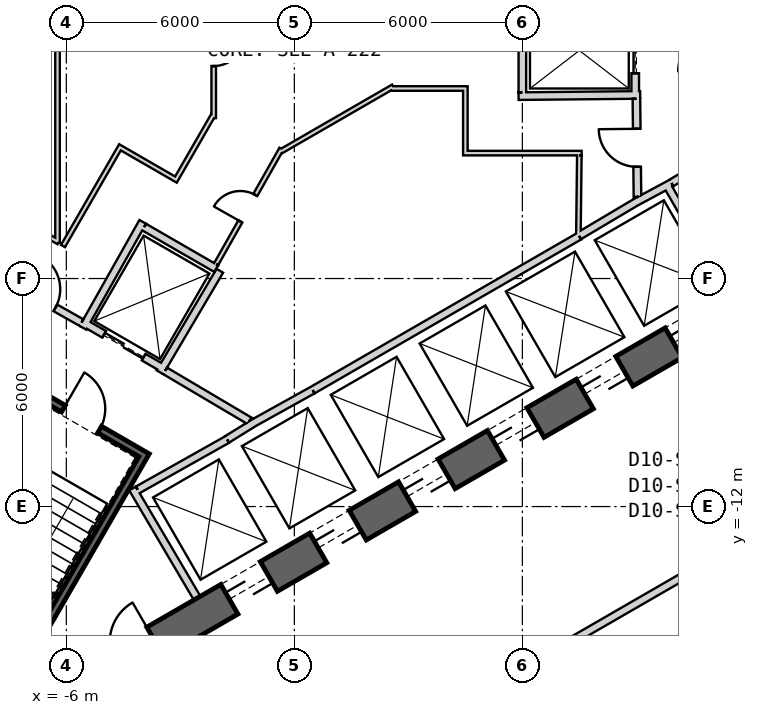
"""IFC4 building model, lengths in metres.
Left out: names, types, materials, properties, quantities, classifications, styles, units other than length and angle.
Written with IfcOpenShell. Run it as: python <this file> out.ifc"""

import sys

from ifc_helpers import new_model, si_unit, direction, frame, frame_2d, origin, place, context, subcontext, project, spatial, rectangle, extrude, element, fill, save


model = new_model("IFC4")
c1 = context("Model", 3, precision=1e-05, world=origin(), true_north=direction((0.0, 1.0)))
c2 = subcontext(c1, "Body", "Model", "MODEL_VIEW")
j1 = project(units=[si_unit("LENGTHUNIT", "METRE"), si_unit("PLANEANGLEUNIT", "RADIAN")], contexts=[c1])
p1 = place(None, origin())
s1 = spatial("IfcSite", under=j1, at=p1, CompositionType="ELEMENT")
p2 = place(p1, origin())
s2 = spatial("IfcBuilding", under=s1, at=p2, CompositionType="ELEMENT")
p3 = place(p2, frame((0.0, 0.0, 181.2)))
s3 = spatial("IfcBuildingStorey", under=s2, at=p3, CompositionType="ELEMENT", Elevation=181.2)
p4 = place(p3, frame((-7.825, -17.97, 0.0), z_axis=(0.0, 0.0, 1.0), x_axis=(0.866028369851, 0.499994862586, 0.0)))
e1 = element("IfcWall", 1, at=p4, inside=s3, PredefinedType="SHEAR", context=c2, shape_type="SweptSolid", body=[
    extrude(rectangle(XDim=31.523, YDim=0.9, at=frame_2d((15.762, 0.0))), origin(), (0.0, 0.0, 1.0), 4.0),
])
p5 = place(p4, frame((7.062, 0.0, 0.0)))
e2 = element("IfcOpeningElement", 2, at=p5, cuts=e1, PredefinedType="OPENING", context=c2, shape_type="SweptSolid", body=[
    extrude(rectangle(XDim=1.2, YDim=2.4, at=frame_2d((0.6, 1.2))), frame((0.0, 0.46, 0.0), z_axis=(0.0, -1.0, 0.0), x_axis=(1.0, 0.0, 0.0)), (0.0, 0.0, 1.0), 0.92),
])
p6 = place(p4, frame((9.762, 0.0, 0.0)))
e3 = element("IfcOpeningElement", 3, at=p6, cuts=e1, PredefinedType="OPENING", context=c2, shape_type="SweptSolid", body=[
    extrude(rectangle(XDim=1.2, YDim=2.4, at=frame_2d((0.6, 1.2))), frame((0.0, 0.46, 0.0), z_axis=(0.0, -1.0, 0.0), x_axis=(1.0, 0.0, 0.0)), (0.0, 0.0, 1.0), 0.92),
])
p7 = place(p4, frame((12.462, 0.0, 0.0)))
e4 = element("IfcOpeningElement", 4, at=p7, cuts=e1, PredefinedType="OPENING", context=c2, shape_type="SweptSolid", body=[
    extrude(rectangle(XDim=1.2, YDim=2.4, at=frame_2d((0.6, 1.2))), frame((0.0, 0.46, 0.0), z_axis=(0.0, -1.0, 0.0), x_axis=(1.0, 0.0, 0.0)), (0.0, 0.0, 1.0), 0.92),
])
p8 = place(p4, frame((15.162, 0.0, 0.0)))
e5 = element("IfcOpeningElement", 5, at=p8, cuts=e1, PredefinedType="OPENING", context=c2, shape_type="SweptSolid", body=[
    extrude(rectangle(XDim=1.2, YDim=2.4, at=frame_2d((0.6, 1.2))), frame((0.0, 0.46, 0.0), z_axis=(0.0, -1.0, 0.0), x_axis=(1.0, 0.0, 0.0)), (0.0, 0.0, 1.0), 0.92),
])
p9 = place(p4, frame((17.862, 0.0, 0.0)))
e6 = element("IfcOpeningElement", 6, at=p9, cuts=e1, PredefinedType="OPENING", context=c2, shape_type="SweptSolid", body=[
    extrude(rectangle(XDim=1.2, YDim=2.4, at=frame_2d((0.6, 1.2))), frame((0.0, 0.46, 0.0), z_axis=(0.0, -1.0, 0.0), x_axis=(1.0, 0.0, 0.0)), (0.0, 0.0, 1.0), 0.92),
])
p10 = place(p4, frame((20.562, 0.0, 0.0)))
e7 = element("IfcOpeningElement", 7, at=p10, cuts=e1, PredefinedType="OPENING", context=c2, shape_type="SweptSolid", body=[
    extrude(rectangle(XDim=1.2, YDim=2.4, at=frame_2d((0.6, 1.2))), frame((0.0, 0.46, 0.0), z_axis=(0.0, -1.0, 0.0), x_axis=(1.0, 0.0, 0.0)), (0.0, 0.0, 1.0), 0.92),
])
p11 = place(p4, frame((26.712, 0.0, 0.0)))
e8 = element("IfcOpeningElement", 8, at=p11, cuts=e1, PredefinedType="OPENING", context=c2, shape_type="SweptSolid", body=[
    extrude(rectangle(XDim=1.2, YDim=2.4, at=frame_2d((0.6, 1.2))), frame((0.0, 0.46, 0.0), z_axis=(0.0, -1.0, 0.0), x_axis=(1.0, 0.0, 0.0)), (0.0, 0.0, 1.0), 0.92),
])
p12 = place(p4, frame((3.612, 0.0, 0.0)))
e9 = element("IfcOpeningElement", 9, at=p12, cuts=e1, PredefinedType="OPENING", context=c2, shape_type="SweptSolid", body=[
    extrude(rectangle(XDim=1.2, YDim=2.4, at=frame_2d((0.6, 1.2))), frame((0.0, 0.46, 0.0), z_axis=(0.0, -1.0, 0.0), x_axis=(1.0, 0.0, 0.0)), (0.0, 0.0, 1.0), 0.92),
])
p13 = place(p3, frame((0.483, -8.936, 0.0), z_axis=(0.0, 0.0, 1.0), x_axis=(0.866030989016, 0.499990325971, 0.0)))
e10 = element("IfcWall", 10, at=p13, inside=s3, PredefinedType="PLUMBINGWALL", context=c2, shape_type="SweptSolid", body=[
    extrude(rectangle(XDim=8.1, YDim=0.2, at=frame_2d((4.05, 0.0))), origin(), (0.0, 0.0, 1.0), 3.7),
])
p14 = place(p3, frame((9.795, -3.525, 0.0), z_axis=(0.0, 0.0, 1.0), x_axis=(0.499984717929, -0.866034226713, 0.0)))
e11 = element("IfcWall", 11, at=p14, inside=s3, PredefinedType="PLUMBINGWALL", context=c2, shape_type="SweptSolid", body=[
    extrude(rectangle(XDim=3.25, YDim=0.2, at=frame_2d((1.625, 0.0))), origin(), (0.0, 0.0, 1.0), 3.7),
])
p15 = place(p3, frame((8.974, -3.999, 0.0), z_axis=(0.0, 0.0, 1.0), x_axis=(0.880907015104, 0.473289373154, 0.0)))
e12 = element("IfcWall", 12, at=p15, inside=s3, PredefinedType="PLUMBINGWALL", context=c2, shape_type="SweptSolid", body=[
    extrude(rectangle(XDim=1.078, YDim=0.2, at=frame_2d((0.539, 0.0))), origin(), (0.0, 0.0, 1.0), 3.7),
])
p16 = place(p3, frame((7.493, -4.878, 0.0), z_axis=(0.0, 0.0, 1.0), x_axis=(0.859981807212, 0.510324691999, 0.0)))
e13 = element("IfcWall", 13, at=p16, inside=s3, PredefinedType="PLUMBINGWALL", context=c2, shape_type="SweptSolid", body=[
    extrude(rectangle(XDim=1.845, YDim=0.2, at=frame_2d((0.922, 0.0))), origin(), (0.0, 0.0, 1.0), 3.7),
])
p17 = place(p3, frame((-2.558, -14.409, 0.0), z_axis=(0.0, 0.0, 1.0), x_axis=(-0.507997497166, 0.861358544901, 0.0)))
e14 = element("IfcWall", 14, at=p17, inside=s3, PredefinedType="PLUMBINGWALL", context=c2, shape_type="SweptSolid", body=[
    extrude(rectangle(XDim=3.35, YDim=0.2, at=frame_2d((1.675, 0.0))), origin(), (0.0, 0.0, 1.0), 3.7),
])
p18 = place(p3, frame((-1.769, -10.237, 0.0), z_axis=(0.0, 0.0, 1.0), x_axis=(-0.871534483978, -0.490334215854, 0.0)))
e15 = element("IfcWall", 15, at=p18, inside=s3, PredefinedType="PLUMBINGWALL", context=c2, shape_type="SweptSolid", body=[
    extrude(rectangle(XDim=2.7, YDim=0.2, at=frame_2d((1.35, 0.0))), origin(), (0.0, 0.0, 1.0), 3.7),
])
p19 = place(p3, frame((-1.024, -9.771, 0.0), z_axis=(0.0, 0.0, 1.0), x_axis=(-0.850348075135, -0.526220629693, 0.0)))
e16 = element("IfcWall", 16, at=p19, inside=s3, PredefinedType="PLUMBINGWALL", context=c2, shape_type="SweptSolid", body=[
    extrude(rectangle(XDim=0.878, YDim=0.2, at=frame_2d((0.439, 0.0))), origin(), (0.0, 0.0, 1.0), 3.7),
])
p20 = place(p3, frame((-1.13, -9.831, 0.0), z_axis=(0.0, 0.0, 1.0), x_axis=(0.874269620932, 0.485440655401, 0.0)))
e17 = element("IfcWall", 17, at=p20, inside=s3, PredefinedType="PLUMBINGWALL", context=c2, shape_type="SweptSolid", body=[
    extrude(rectangle(XDim=1.845, YDim=0.2, at=frame_2d((0.922, 0.0))), origin(), (0.0, 0.0, 1.0), 3.7),
])
p21 = place(p3, frame((8.97, 1.2, 0.0), z_axis=(0.0, 0.0, 1.0), x_axis=(0.0, -1.0, 0.0)))
e18 = element("IfcWall", 18, at=p21, inside=s3, PredefinedType="PLUMBINGWALL", context=c2, shape_type="SweptSolid", body=[
    extrude(rectangle(XDim=2.4, YDim=0.2, at=frame_2d((1.2, 0.0))), origin(), (0.0, 0.0, 1.0), 3.7),
])
p22 = place(p21, frame((0.6, 0.0, 0.0)))
e19 = element("IfcOpeningElement", 19, at=p22, cuts=e18, PredefinedType="OPENING", context=c2, shape_type="SweptSolid", body=[
    extrude(rectangle(XDim=1.2, YDim=2.4, at=frame_2d((0.6, 1.2))), frame((0.0, 0.11, 0.0), z_axis=(0.0, -1.0, 0.0), x_axis=(1.0, 0.0, 0.0)), (0.0, 0.0, 1.0), 0.22),
])
p23 = place(p3, frame((5.9, -1.201, 0.0), z_axis=(0.0, 0.0, 1.0), x_axis=(0.999950064753, 0.009993397809, 0.0)))
e20 = element("IfcWall", 20, at=p23, inside=s3, PredefinedType="PLUMBINGWALL", context=c2, shape_type="SweptSolid", body=[
    extrude(rectangle(XDim=3.2, YDim=0.2, at=frame_2d((1.6, 0.0))), origin(), (0.0, 0.0, 1.0), 3.7),
])
p24 = place(p3, frame((6.0, -1.1, 0.0), z_axis=(0.0, 0.0, 1.0), x_axis=(0.0, 1.0, 0.0)))
e21 = element("IfcWall", 21, at=p24, inside=s3, PredefinedType="PLUMBINGWALL", context=c2, shape_type="SweptSolid", body=[
    extrude(rectangle(XDim=2.205, YDim=0.2, at=frame_2d((1.102, 0.0))), origin(), (0.0, 0.0, 1.0), 3.7),
])
p25 = place(p3, frame((-3.905, -10.563, -0.3), z_axis=(0.0, 0.0, 1.0), x_axis=(-0.500012932018, -0.866017937352, 0.0)))
e22 = element("IfcWall", 22, at=p25, inside=s3, PredefinedType="SHEAR", context=c2, shape_type="SweptSolid", body=[
    extrude(rectangle(XDim=8.1, YDim=0.2, at=frame_2d((4.05, 0.0))), origin(), (0.0, 0.0, 1.0), 4.0),
])
p26 = place(p3, frame((-4.041, -10.599, -0.3), z_axis=(0.0, 0.0, 1.0), x_axis=(-0.866047807691, 0.499961193289, 0.0)))
e23 = element("IfcWall", 23, at=p26, inside=s3, PredefinedType="SHEAR", context=c2, shape_type="SweptSolid", body=[
    extrude(rectangle(XDim=3.6, YDim=0.2, at=frame_2d((1.8, 0.0))), origin(), (0.0, 0.0, 1.0), 4.0),
])
p27 = place(p26, frame((1.25, 0.0, 0.3)))
e24 = element("IfcOpeningElement", 24, at=p27, cuts=e23, PredefinedType="OPENING", context=c2, shape_type="SweptSolid", body=[
    extrude(rectangle(XDim=1.1, YDim=2.1, at=frame_2d((0.55, 1.05))), frame((0.0, 0.11, 0.0), z_axis=(0.0, -1.0, 0.0), x_axis=(1.0, 0.0, 0.0)), (0.0, 0.0, 1.0), 0.22),
])
p28 = place(p3, frame((-3.446, -8.368, 0.0), z_axis=(0.0, 0.0, 1.0), x_axis=(-0.866024647952, 0.500001309137, 0.0)))
e25 = element("IfcWall", 25, at=p28, inside=s3, PredefinedType="PLUMBINGWALL", context=c2, shape_type="SweptSolid", body=[
    extrude(rectangle(XDim=2.4, YDim=0.2, at=frame_2d((1.2, 0.0))), origin(), (0.0, 0.0, 1.0), 3.7),
])
p29 = place(p28, frame((0.6, 0.0, 0.0)))
e26 = element("IfcOpeningElement", 26, at=p29, cuts=e25, PredefinedType="OPENING", context=c2, shape_type="SweptSolid", body=[
    extrude(rectangle(XDim=1.2, YDim=2.4, at=frame_2d((0.6, 1.2))), frame((0.0, 0.11, 0.0), z_axis=(0.0, -1.0, 0.0), x_axis=(1.0, 0.0, 0.0)), (0.0, 0.0, 1.0), 0.22),
])
p30 = place(p3, frame((-1.961, -5.796, 0.0), z_axis=(0.0, 0.0, 1.0), x_axis=(-0.508647062354, -0.860975125052, 0.0)))
e27 = element("IfcWall", 27, at=p30, inside=s3, PredefinedType="PLUMBINGWALL", context=c2, shape_type="SweptSolid", body=[
    extrude(rectangle(XDim=3.1, YDim=0.2, at=frame_2d((1.55, 0.0))), origin(), (0.0, 0.0, 1.0), 3.7),
])
p31 = place(p3, frame((-3.99, -4.509, 0.0), z_axis=(0.0, 0.0, 1.0), x_axis=(-0.491358283181, -0.870957540612, 0.0)))
e28 = element("IfcWall", 28, at=p31, inside=s3, PredefinedType="PLUMBINGWALL", context=c2, shape_type="SweptSolid", body=[
    extrude(rectangle(XDim=3.2, YDim=0.2, at=frame_2d((1.6, 0.0))), origin(), (0.0, 0.0, 1.0), 3.7),
])
p32 = place(p3, frame((-3.953, -4.646, 0.0), z_axis=(0.0, 0.0, 1.0), x_axis=(0.866038900241, -0.499976622722, 0.0)))
e29 = element("IfcWall", 29, at=p32, inside=s3, PredefinedType="PLUMBINGWALL", context=c2, shape_type="SweptSolid", body=[
    extrude(rectangle(XDim=2.189, YDim=0.2, at=frame_2d((1.095, 0.0))), origin(), (0.0, 0.0, 1.0), 3.7),
])
p33 = place(p3, frame((12.245, -2.109, 0.0), z_axis=(0.0, 0.0, 1.0), x_axis=(-0.860414880418, -0.509594185166, 0.0)))
e30 = element("IfcWall", 30, at=p33, inside=s3, PredefinedType="PARTITIONING", context=c2, shape_type="SweptSolid", body=[
    extrude(rectangle(XDim=2.7, YDim=0.2, at=frame_2d((1.35, 0.0))), origin(), (0.0, 0.0, 1.0), 3.7),
])
p34 = place(p3, frame((9.029, -3.851, 0.0), z_axis=(0.0, 0.0, 1.0), x_axis=(-0.010783593937, 0.99994185536, 0.0)))
e31 = element("IfcWall", 31, at=p34, inside=s3, PredefinedType="PARTITIONING", context=c2, shape_type="SweptSolid", body=[
    extrude(rectangle(XDim=2.581, YDim=0.2, at=frame_2d((1.291, 0.0))), origin(), (0.0, 0.0, 1.0), 3.7),
])
p35 = place(p34, frame((0.791, 0.0, 0.0)))
e32 = element("IfcOpeningElement", 32, at=p35, cuts=e31, PredefinedType="OPENING", context=c2, shape_type="SweptSolid", body=[
    extrude(rectangle(XDim=1.0, YDim=2.1, at=frame_2d((0.5, 1.05))), frame((0.0, 0.11, 0.0), z_axis=(0.0, -1.0, 0.0), x_axis=(1.0, 0.0, 0.0)), (0.0, 0.0, 1.0), 0.22),
])
p36 = place(p3, frame((-3.401, -8.43, 0.0), z_axis=(0.0, 0.0, 1.0), x_axis=(0.860615607571, -0.509255118781, 0.0)))
e33 = element("IfcWall", 33, at=p36, inside=s3, PredefinedType="PARTITIONING", context=c2, shape_type="SweptSolid", body=[
    extrude(rectangle(XDim=2.581, YDim=0.2, at=frame_2d((1.29, 0.0))), origin(), (0.0, 0.0, 1.0), 3.7),
])
p37 = place(p3, frame((-7.849, -5.894, 0.0), z_axis=(0.0, 0.0, 1.0), x_axis=(0.871363259478, -0.490638431059, 0.0)))
e34 = element("IfcWall", 34, at=p37, inside=s3, PredefinedType="PARTITIONING", context=c2, shape_type="SweptSolid", body=[
    extrude(rectangle(XDim=2.581, YDim=0.2, at=frame_2d((1.291, 0.0))), origin(), (0.0, 0.0, 1.0), 3.7),
])
p38 = place(p37, frame((0.791, 0.0, 0.0)))
e35 = element("IfcOpeningElement", 35, at=p38, cuts=e34, PredefinedType="OPENING", context=c2, shape_type="SweptSolid", body=[
    extrude(rectangle(XDim=1.0, YDim=2.1, at=frame_2d((0.5, 1.05))), frame((0.0, 0.11, 0.0), z_axis=(0.0, -1.0, 0.0), x_axis=(1.0, 0.0, 0.0)), (0.0, 0.0, 1.0), 0.22),
])
p39 = place(p3, frame((-0.34, -2.586, 0.0), z_axis=(0.0, 0.0, 1.0), x_axis=(-0.492647196214, -0.870229130782, 0.0)))
e36 = element("IfcWall", 36, at=p39, inside=s3, PredefinedType="PARTITIONING", context=c2, shape_type="SweptSolid", body=[
    extrude(rectangle(XDim=3.49, YDim=0.12, at=frame_2d((1.745, 0.0))), origin(), (0.0, 0.0, 1.0), 3.7),
])
p40 = place(p39, frame((1.396, 0.0, 0.0)))
e37 = element("IfcOpeningElement", 37, at=p40, cuts=e36, PredefinedType="OPENING", context=c2, shape_type="SweptSolid", body=[
    extrude(rectangle(XDim=0.8, YDim=2.1, at=frame_2d((0.4, 1.05))), frame((0.0, 0.07, 0.0), z_axis=(0.0, -1.0, 0.0), x_axis=(1.0, 0.0, 0.0)), (0.0, 0.0, 1.0), 0.14),
])
p41 = place(p3, frame((2.602, -0.948, 0.0), z_axis=(0.0, 0.0, 1.0), x_axis=(-0.866025804792, -0.499999305434, 0.0)))
e38 = element("IfcWall", 38, at=p41, inside=s3, PredefinedType="PARTITIONING", context=c2, shape_type="SweptSolid", body=[
    extrude(rectangle(XDim=3.435, YDim=0.12, at=frame_2d((1.718, 0.0))), origin(), (0.0, 0.0, 1.0), 3.7),
])
p42 = place(p3, frame((4.56, -1.0, 0.0), z_axis=(0.0, 0.0, 1.0), x_axis=(-1.0, 0.0, 0.0)))
e39 = element("IfcWall", 39, at=p42, inside=s3, PredefinedType="PARTITIONING", context=c2, shape_type="SweptSolid", body=[
    extrude(rectangle(XDim=2.03, YDim=0.12, at=frame_2d((1.015, 0.0))), origin(), (0.0, 0.0, 1.0), 3.7),
])
p43 = place(p3, frame((4.5, -2.76, 0.0), z_axis=(0.0, 0.0, 1.0), x_axis=(0.0, 1.0, 0.0)))
e40 = element("IfcWall", 40, at=p43, inside=s3, PredefinedType="PARTITIONING", context=c2, shape_type="SweptSolid", body=[
    extrude(rectangle(XDim=1.7, YDim=0.12, at=frame_2d((0.85, 0.0))), origin(), (0.0, 0.0, 1.0), 3.7),
])
p44 = place(p3, frame((7.56, -2.7, 0.0), z_axis=(0.0, 0.0, 1.0), x_axis=(-1.0, 0.0, 0.0)))
e41 = element("IfcWall", 41, at=p44, inside=s3, PredefinedType="PARTITIONING", context=c2, shape_type="SweptSolid", body=[
    extrude(rectangle(XDim=3.0, YDim=0.12, at=frame_2d((1.5, 0.0))), origin(), (0.0, 0.0, 1.0), 3.7),
])
p45 = place(p3, frame((7.475, -4.865, 0.0), z_axis=(0.0, 0.0, 1.0), x_axis=(0.011716133148, 0.999931363757, 0.0)))
e42 = element("IfcWall", 42, at=p45, inside=s3, PredefinedType="PARTITIONING", context=c2, shape_type="SweptSolid", body=[
    extrude(rectangle(XDim=2.105, YDim=0.12, at=frame_2d((1.052, 0.0))), origin(), (0.0, 0.0, 1.0), 3.7),
])
p46 = place(p3, frame((-6.231, 5.062, 0.0), z_axis=(0.0, 0.0, 1.0), x_axis=(0.0, -1.0, 0.0)))
e43 = element("IfcWall", 43, at=p46, inside=s3, PredefinedType="PARTITIONING", context=c2, shape_type="SweptSolid", body=[
    extrude(rectangle(XDim=10.125, YDim=0.12, at=frame_2d((5.062, 0.0))), origin(), (0.0, 0.0, 1.0), 3.7),
])
p47 = place(p3, frame((-7.95, -4.041, 0.0), z_axis=(0.0, 0.0, 1.0), x_axis=(0.867071050325, -0.498184497639, 0.0)))
e44 = element("IfcWall", 44, at=p47, inside=s3, PredefinedType="PARTITIONING", context=c2, shape_type="SweptSolid", body=[
    extrude(rectangle(XDim=2.017, YDim=0.12, at=frame_2d((1.008, 0.0))), origin(), (0.0, 0.0, 1.0), 3.7),
])
p48 = place(p47, frame((0.608, 0.0, 0.0)))
e45 = element("IfcOpeningElement", 45, at=p48, cuts=e44, PredefinedType="OPENING", context=c2, shape_type="SweptSolid", body=[
    extrude(rectangle(XDim=0.8, YDim=2.1, at=frame_2d((0.4, 1.05))), frame((0.0, 0.07, 0.0), z_axis=(0.0, -1.0, 0.0), x_axis=(1.0, 0.0, 0.0)), (0.0, 0.0, 1.0), 0.14),
])
p49 = place(p3, frame((-2.122, -1.779, 0.0), z_axis=(0.0, 0.0, 1.0), x_axis=(0.0, 1.0, 0.0)))
e46 = element("IfcWall", 46, at=p49, inside=s3, PredefinedType="PARTITIONING", context=c2, shape_type="SweptSolid", body=[
    extrude(rectangle(XDim=3.435, YDim=0.12, at=frame_2d((1.718, 0.0))), origin(), (0.0, 0.0, 1.0), 3.7),
])
p50 = place(p49, frame((1.37, 0.0, 0.0)))
e47 = element("IfcOpeningElement", 47, at=p50, cuts=e46, PredefinedType="OPENING", context=c2, shape_type="SweptSolid", body=[
    extrude(rectangle(XDim=0.8, YDim=2.1, at=frame_2d((0.4, 1.05))), frame((0.0, 0.07, 0.0), z_axis=(0.0, -1.0, 0.0), x_axis=(1.0, 0.0, 0.0)), (0.0, 0.0, 1.0), 0.14),
])
p51 = place(p3, frame((-3.146, -3.449, 0.0), z_axis=(0.0, 0.0, 1.0), x_axis=(0.500007041985, 0.866021338054, 0.0)))
e48 = element("IfcWall", 48, at=p51, inside=s3, PredefinedType="PARTITIONING", context=c2, shape_type="SweptSolid", body=[
    extrude(rectangle(XDim=2.03, YDim=0.12, at=frame_2d((1.015, 0.0))), origin(), (0.0, 0.0, 1.0), 3.7),
])
p52 = place(p3, frame((-4.64, -2.517, 0.0), z_axis=(0.0, 0.0, 1.0), x_axis=(0.865989465428, -0.500062241894, 0.0)))
e49 = element("IfcWall", 49, at=p52, inside=s3, PredefinedType="PARTITIONING", context=c2, shape_type="SweptSolid", body=[
    extrude(rectangle(XDim=1.7, YDim=0.12, at=frame_2d((0.85, 0.0))), origin(), (0.0, 0.0, 1.0), 3.7),
])
p53 = place(p3, frame((-6.088, -5.145, 0.0), z_axis=(0.0, 0.0, 1.0), x_axis=(0.500050696077, 0.865996132412, 0.0)))
e50 = element("IfcWall", 50, at=p53, inside=s3, PredefinedType="PARTITIONING", context=c2, shape_type="SweptSolid", body=[
    extrude(rectangle(XDim=2.94, YDim=0.12, at=frame_2d((1.47, 0.0))), origin(), (0.0, 0.0, 1.0), 3.7),
])
p54 = place(p3, frame((-0.223, -19.874, 0.0), z_axis=(0.0, 0.0, 1.0), x_axis=(0.866025366729, 0.500000064182, 0.0)))
e51 = element("IfcWall", 51, at=p54, inside=s3, PredefinedType="PARTITIONING", context=c2, shape_type="SweptSolid", body=[
    extrude(rectangle(XDim=12.18, YDim=0.2, at=frame_2d((6.09, 0.0))), origin(), (0.0, 0.0, 1.0), 2.98),
])
p55 = place(p35, origin())
e52 = element("IfcDoor", 52, at=p55, inside=s3, OperationType="SINGLE_SWING_RIGHT", PredefinedType="USERDEFINED", context=c2, shape_type="SweptSolid", body=[
    extrude(rectangle(XDim=1.0, YDim=2.1, at=frame_2d((0.5, 1.05))), frame((0.0, 0.025, 0.0), z_axis=(0.0, -1.0, 0.0), x_axis=(1.0, 0.0, 0.0)), (0.0, 0.0, 1.0), 0.05),
])
fill(e32, e52)
p56 = place(p22, origin())
e53 = element("IfcDoor", 53, at=p56, inside=s3, OperationType="SLIDING_TO_LEFT", PredefinedType="USERDEFINED", context=c2, shape_type="SweptSolid", body=[
    extrude(rectangle(XDim=1.2, YDim=2.4, at=frame_2d((0.6, 1.2))), frame((0.0, 0.025, 0.0), z_axis=(0.0, -1.0, 0.0), x_axis=(1.0, 0.0, 0.0)), (0.0, 0.0, 1.0), 0.05),
])
fill(e19, e53)
p57 = place(p27, origin())
e54 = element("IfcDoor", 54, at=p57, inside=s3, OperationType="SINGLE_SWING_LEFT", PredefinedType="USERDEFINED", context=c2, shape_type="SweptSolid", body=[
    extrude(rectangle(XDim=1.1, YDim=2.1, at=frame_2d((0.55, 1.05))), frame((0.0, 0.025, 0.0), z_axis=(0.0, -1.0, 0.0), x_axis=(1.0, 0.0, 0.0)), (0.0, 0.0, 1.0), 0.05),
])
fill(e24, e54)
p58 = place(p38, origin())
e55 = element("IfcDoor", 55, at=p58, inside=s3, OperationType="SINGLE_SWING_RIGHT", PredefinedType="USERDEFINED", context=c2, shape_type="SweptSolid", body=[
    extrude(rectangle(XDim=1.0, YDim=2.1, at=frame_2d((0.5, 1.05))), frame((0.0, 0.025, 0.0), z_axis=(0.0, -1.0, 0.0), x_axis=(1.0, 0.0, 0.0)), (0.0, 0.0, 1.0), 0.05),
])
fill(e35, e55)
p59 = place(p29, origin())
e56 = element("IfcDoor", 56, at=p59, inside=s3, OperationType="SLIDING_TO_LEFT", PredefinedType="USERDEFINED", context=c2, shape_type="SweptSolid", body=[
    extrude(rectangle(XDim=1.2, YDim=2.4, at=frame_2d((0.6, 1.2))), frame((0.0, 0.025, 0.0), z_axis=(0.0, -1.0, 0.0), x_axis=(1.0, 0.0, 0.0)), (0.0, 0.0, 1.0), 0.05),
])
fill(e26, e56)
p60 = place(p40, origin())
e57 = element("IfcDoor", 57, at=p60, inside=s3, OperationType="SINGLE_SWING_RIGHT", PredefinedType="USERDEFINED", context=c2, shape_type="SweptSolid", body=[
    extrude(rectangle(XDim=0.8, YDim=2.1, at=frame_2d((0.4, 1.05))), frame((0.0, 0.025, 0.0), z_axis=(0.0, -1.0, 0.0), x_axis=(1.0, 0.0, 0.0)), (0.0, 0.0, 1.0), 0.05),
])
fill(e37, e57)
p61 = place(p50, origin())
e58 = element("IfcDoor", 58, at=p61, inside=s3, OperationType="SINGLE_SWING_RIGHT", PredefinedType="USERDEFINED", context=c2, shape_type="SweptSolid", body=[
    extrude(rectangle(XDim=0.8, YDim=2.1, at=frame_2d((0.4, 1.05))), frame((0.0, 0.025, 0.0), z_axis=(0.0, -1.0, 0.0), x_axis=(1.0, 0.0, 0.0)), (0.0, 0.0, 1.0), 0.05),
])
fill(e47, e58)
p62 = place(p5, origin())
e59 = element("IfcDoor", 59, at=p62, inside=s3, OperationType="SLIDING_TO_LEFT", PredefinedType="USERDEFINED", context=c2, shape_type="SweptSolid", body=[
    extrude(rectangle(XDim=1.2, YDim=2.4, at=frame_2d((0.6, 1.2))), frame((0.0, 0.025, 0.0), z_axis=(0.0, -1.0, 0.0), x_axis=(1.0, 0.0, 0.0)), (0.0, 0.0, 1.0), 0.05),
])
fill(e2, e59)
p63 = place(p6, origin())
e60 = element("IfcDoor", 60, at=p63, inside=s3, OperationType="SLIDING_TO_LEFT", PredefinedType="USERDEFINED", context=c2, shape_type="SweptSolid", body=[
    extrude(rectangle(XDim=1.2, YDim=2.4, at=frame_2d((0.6, 1.2))), frame((0.0, 0.025, 0.0), z_axis=(0.0, -1.0, 0.0), x_axis=(1.0, 0.0, 0.0)), (0.0, 0.0, 1.0), 0.05),
])
fill(e3, e60)
p64 = place(p7, origin())
e61 = element("IfcDoor", 61, at=p64, inside=s3, OperationType="SLIDING_TO_LEFT", PredefinedType="USERDEFINED", context=c2, shape_type="SweptSolid", body=[
    extrude(rectangle(XDim=1.2, YDim=2.4, at=frame_2d((0.6, 1.2))), frame((0.0, 0.025, 0.0), z_axis=(0.0, -1.0, 0.0), x_axis=(1.0, 0.0, 0.0)), (0.0, 0.0, 1.0), 0.05),
])
fill(e4, e61)
p65 = place(p8, origin())
e62 = element("IfcDoor", 62, at=p65, inside=s3, OperationType="SLIDING_TO_LEFT", PredefinedType="USERDEFINED", context=c2, shape_type="SweptSolid", body=[
    extrude(rectangle(XDim=1.2, YDim=2.4, at=frame_2d((0.6, 1.2))), frame((0.0, 0.025, 0.0), z_axis=(0.0, -1.0, 0.0), x_axis=(1.0, 0.0, 0.0)), (0.0, 0.0, 1.0), 0.05),
])
fill(e5, e62)
p66 = place(p9, origin())
e63 = element("IfcDoor", 63, at=p66, inside=s3, OperationType="SLIDING_TO_LEFT", PredefinedType="USERDEFINED", context=c2, shape_type="SweptSolid", body=[
    extrude(rectangle(XDim=1.2, YDim=2.4, at=frame_2d((0.6, 1.2))), frame((0.0, 0.025, 0.0), z_axis=(0.0, -1.0, 0.0), x_axis=(1.0, 0.0, 0.0)), (0.0, 0.0, 1.0), 0.05),
])
fill(e6, e63)
p67 = place(p10, origin())
e64 = element("IfcDoor", 64, at=p67, inside=s3, OperationType="SLIDING_TO_LEFT", PredefinedType="USERDEFINED", context=c2, shape_type="SweptSolid", body=[
    extrude(rectangle(XDim=1.2, YDim=2.4, at=frame_2d((0.6, 1.2))), frame((0.0, 0.025, 0.0), z_axis=(0.0, -1.0, 0.0), x_axis=(1.0, 0.0, 0.0)), (0.0, 0.0, 1.0), 0.05),
])
fill(e7, e64)
save(model, sys.argv[1])
